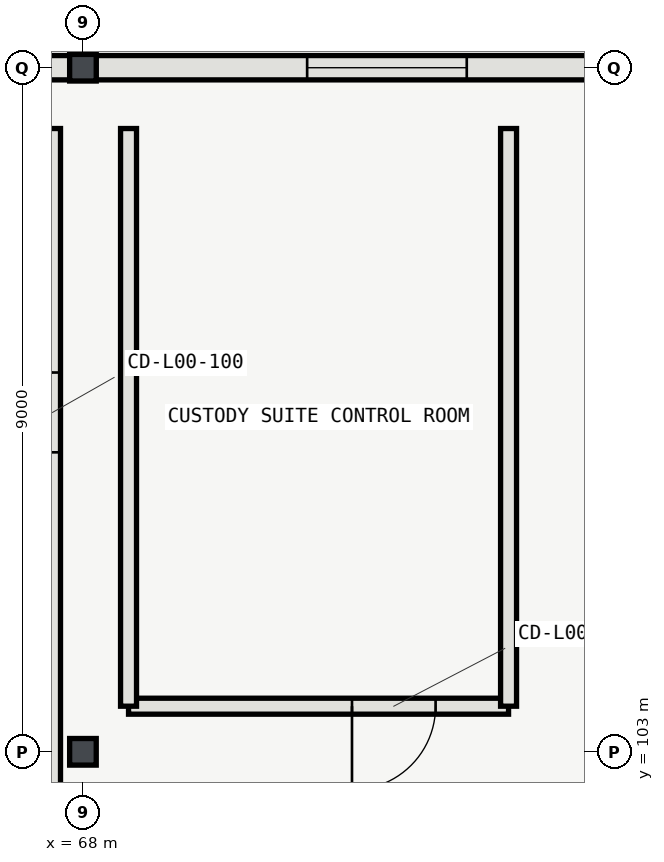
"""IFC4 building model, lengths in metres.
Left out: names, types, materials, properties, quantities, classifications, styles, units other than length and angle.
Written with IfcOpenShell. Run it as: python <this file> out.ifc"""

import sys

from ifc_helpers import new_model, si_unit, direction, frame, frame_2d, origin, origin_2d, place, context, subcontext, project, spatial, rectangle, i_section, extrude, element, fill, save


model = new_model("IFC4")
c1 = context("Model", 3, precision=1e-05, world=origin(), true_north=direction((0.0, 1.0)))
c2 = subcontext(c1, "Body", "Model", "MODEL_VIEW")
j1 = project(units=[si_unit("LENGTHUNIT", "METRE"), si_unit("PLANEANGLEUNIT", "RADIAN")], contexts=[c1])
p1 = place(None, origin())
s1 = spatial("IfcSite", under=j1, at=p1, CompositionType="ELEMENT")
p2 = place(p1, origin())
s2 = spatial("IfcBuilding", under=s1, at=p2, CompositionType="ELEMENT")
p3 = place(p2, origin())
s3 = spatial("IfcBuildingStorey", under=s2, at=p3, CompositionType="ELEMENT", Elevation=0.0)
for number, where, z_axis, x_axis in (
    (1, (68.0, 103.0, 0.0), (0.0, 0.0, 1.0), (1.0, 0.0, 0.0)),
    (2, (68.0, 112.0, 0.0), (0.0, 0.0, 1.0), (1.0, 0.0, 0.0)),
):
    element("IfcColumn", number, at=place(p3, frame(where, z_axis=z_axis, x_axis=x_axis)), inside=s3, PredefinedType="COLUMN", context=c2, shape_type="SweptSolid", body=[
        extrude(i_section(OverallWidth=0.35, OverallDepth=0.35, WebThickness=0.012, FlangeThickness=0.019, FilletRadius=0.02, at=origin_2d()), origin(), (0.0, 0.0, 1.0), 5.4),
    ])
p4 = place(p3, frame((67.829, 112.0, 0.0), z_axis=(0.0, 0.0, 1.0), x_axis=(-1.0, 0.0, 0.0)))
e3 = element("IfcWall", 3, at=p4, inside=s3, PredefinedType="SOLIDWALL", context=c2, shape_type="SweptSolid", body=[
    extrude(rectangle(XDim=7.658, YDim=0.32, at=frame_2d((3.829, 0.0))), origin(), (0.0, 0.0, 1.0), 4.683),
])
p5 = place(p4, frame((2.929, 0.0, 2.4)))
e4 = element("IfcOpeningElement", 4, at=p5, cuts=e3, PredefinedType="OPENING", context=c2, shape_type="SweptSolid", body=[
    extrude(rectangle(XDim=1.8, YDim=0.85, at=frame_2d((0.9, 0.425))), frame((0.0, 0.17, 0.0), z_axis=(0.0, -1.0, 0.0), x_axis=(1.0, 0.0, 0.0)), (0.0, 0.0, 1.0), 0.34),
])
p6 = place(p3, frame((75.829, 112.0, 0.0), z_axis=(0.0, 0.0, 1.0), x_axis=(-1.0, 0.0, 0.0)))
e5 = element("IfcWall", 5, at=p6, inside=s3, PredefinedType="SOLIDWALL", context=c2, shape_type="SweptSolid", body=[
    extrude(rectangle(XDim=7.658, YDim=0.32, at=frame_2d((3.829, 0.0))), origin(), (0.0, 0.0, 1.0), 4.683),
])
p7 = place(p6, frame((2.779, 0.0, 2.4)))
e6 = element("IfcOpeningElement", 6, at=p7, cuts=e5, PredefinedType="OPENING", context=c2, shape_type="SweptSolid", body=[
    extrude(rectangle(XDim=2.1, YDim=0.85, at=frame_2d((1.05, 0.425))), frame((0.0, 0.17, 0.0), z_axis=(0.0, -1.0, 0.0), x_axis=(1.0, 0.0, 0.0)), (0.0, 0.0, 1.0), 0.34),
])
p8 = place(p3, frame((67.6, 95.0, 0.0), z_axis=(0.0, 0.0, 1.0), x_axis=(0.0, 1.0, 0.0)))
e7 = element("IfcWall", 7, at=p8, inside=s3, PredefinedType="PARTITIONING", context=c2, shape_type="SweptSolid", body=[
    extrude(rectangle(XDim=16.2, YDim=0.21, at=frame_2d((8.1, 0.0))), origin(), (0.0, 0.0, 1.0), 5.12),
])
p9 = place(p8, frame((11.94, 0.0, 0.0)))
e8 = element("IfcOpeningElement", 8, at=p9, cuts=e7, PredefinedType="OPENING", context=c2, shape_type="SweptSolid", body=[
    extrude(rectangle(XDim=1.05, YDim=2.15, at=frame_2d((0.525, 1.075))), frame((0.0, 0.115, 0.0), z_axis=(0.0, -1.0, 0.0), x_axis=(1.0, 0.0, 0.0)), (0.0, 0.0, 1.0), 0.23),
])
p10 = place(p3, frame((68.6, 103.6, 0.0), z_axis=(0.0, 0.0, 1.0), x_axis=(1.0, 0.0, 0.0)))
e9 = element("IfcWall", 9, at=p10, inside=s3, PredefinedType="PARTITIONING", context=c2, shape_type="SweptSolid", body=[
    extrude(rectangle(XDim=5.0, YDim=0.21, at=frame_2d((2.5, 0.0))), origin(), (0.0, 0.0, 1.0), 5.12),
])
p11 = place(p10, frame((2.94, 0.0, 0.0)))
e10 = element("IfcOpeningElement", 10, at=p11, cuts=e9, PredefinedType="OPENING", context=c2, shape_type="SweptSolid", body=[
    extrude(rectangle(XDim=1.1, YDim=2.15, at=frame_2d((0.55, 1.075))), frame((0.0, 0.115, 0.0), z_axis=(0.0, -1.0, 0.0), x_axis=(1.0, 0.0, 0.0)), (0.0, 0.0, 1.0), 0.23),
])
for number, where, z_axis, x_axis in (
    (11, (68.6, 111.2, 0.0), (0.0, 0.0, 1.0), (0.0, -1.0, 0.0)),
    (12, (73.6, 103.6, 0.0), (0.0, 0.0, 1.0), (0.0, 1.0, 0.0)),
):
    element("IfcWall", number, at=place(p3, frame(where, z_axis=z_axis, x_axis=x_axis)), inside=s3, PredefinedType="PARTITIONING", context=c2, shape_type="SweptSolid", body=[
        extrude(rectangle(XDim=7.6, YDim=0.21, at=frame_2d((3.8, 0.0))), origin(), (0.0, 0.0, 1.0), 5.12),
    ])
p12 = place(p7, origin())
e13 = element("IfcWindow", 13, at=p12, inside=s3, PartitioningType="SINGLE_PANEL", PredefinedType="WINDOW", context=c2, shape_type="SweptSolid", body=[
    extrude(rectangle(XDim=2.1, YDim=0.85, at=frame_2d((1.05, 0.425))), frame((0.0, 0.03, 0.0), z_axis=(0.0, -1.0, 0.0), x_axis=(1.0, 0.0, 0.0)), (0.0, 0.0, 1.0), 0.06),
])
fill(e6, e13)
p13 = place(p9, origin())
e14 = element("IfcDoor", 14, at=p13, inside=s3, OperationType="SINGLE_SWING_RIGHT", PredefinedType="DOOR", context=c2, shape_type="SweptSolid", body=[
    extrude(rectangle(XDim=1.05, YDim=2.15, at=frame_2d((0.525, 1.075))), frame((0.0, 0.025, 0.0), z_axis=(0.0, -1.0, 0.0), x_axis=(1.0, 0.0, 0.0)), (0.0, 0.0, 1.0), 0.05),
])
fill(e8, e14)
p14 = place(p11, origin())
e15 = element("IfcDoor", 15, at=p14, inside=s3, OperationType="SINGLE_SWING_LEFT", PredefinedType="DOOR", context=c2, shape_type="SweptSolid", body=[
    extrude(rectangle(XDim=1.1, YDim=2.15, at=frame_2d((0.55, 1.075))), frame((0.0, 0.025, 0.0), z_axis=(0.0, -1.0, 0.0), x_axis=(1.0, 0.0, 0.0)), (0.0, 0.0, 1.0), 0.05),
])
fill(e10, e15)
save(model, sys.argv[1])
